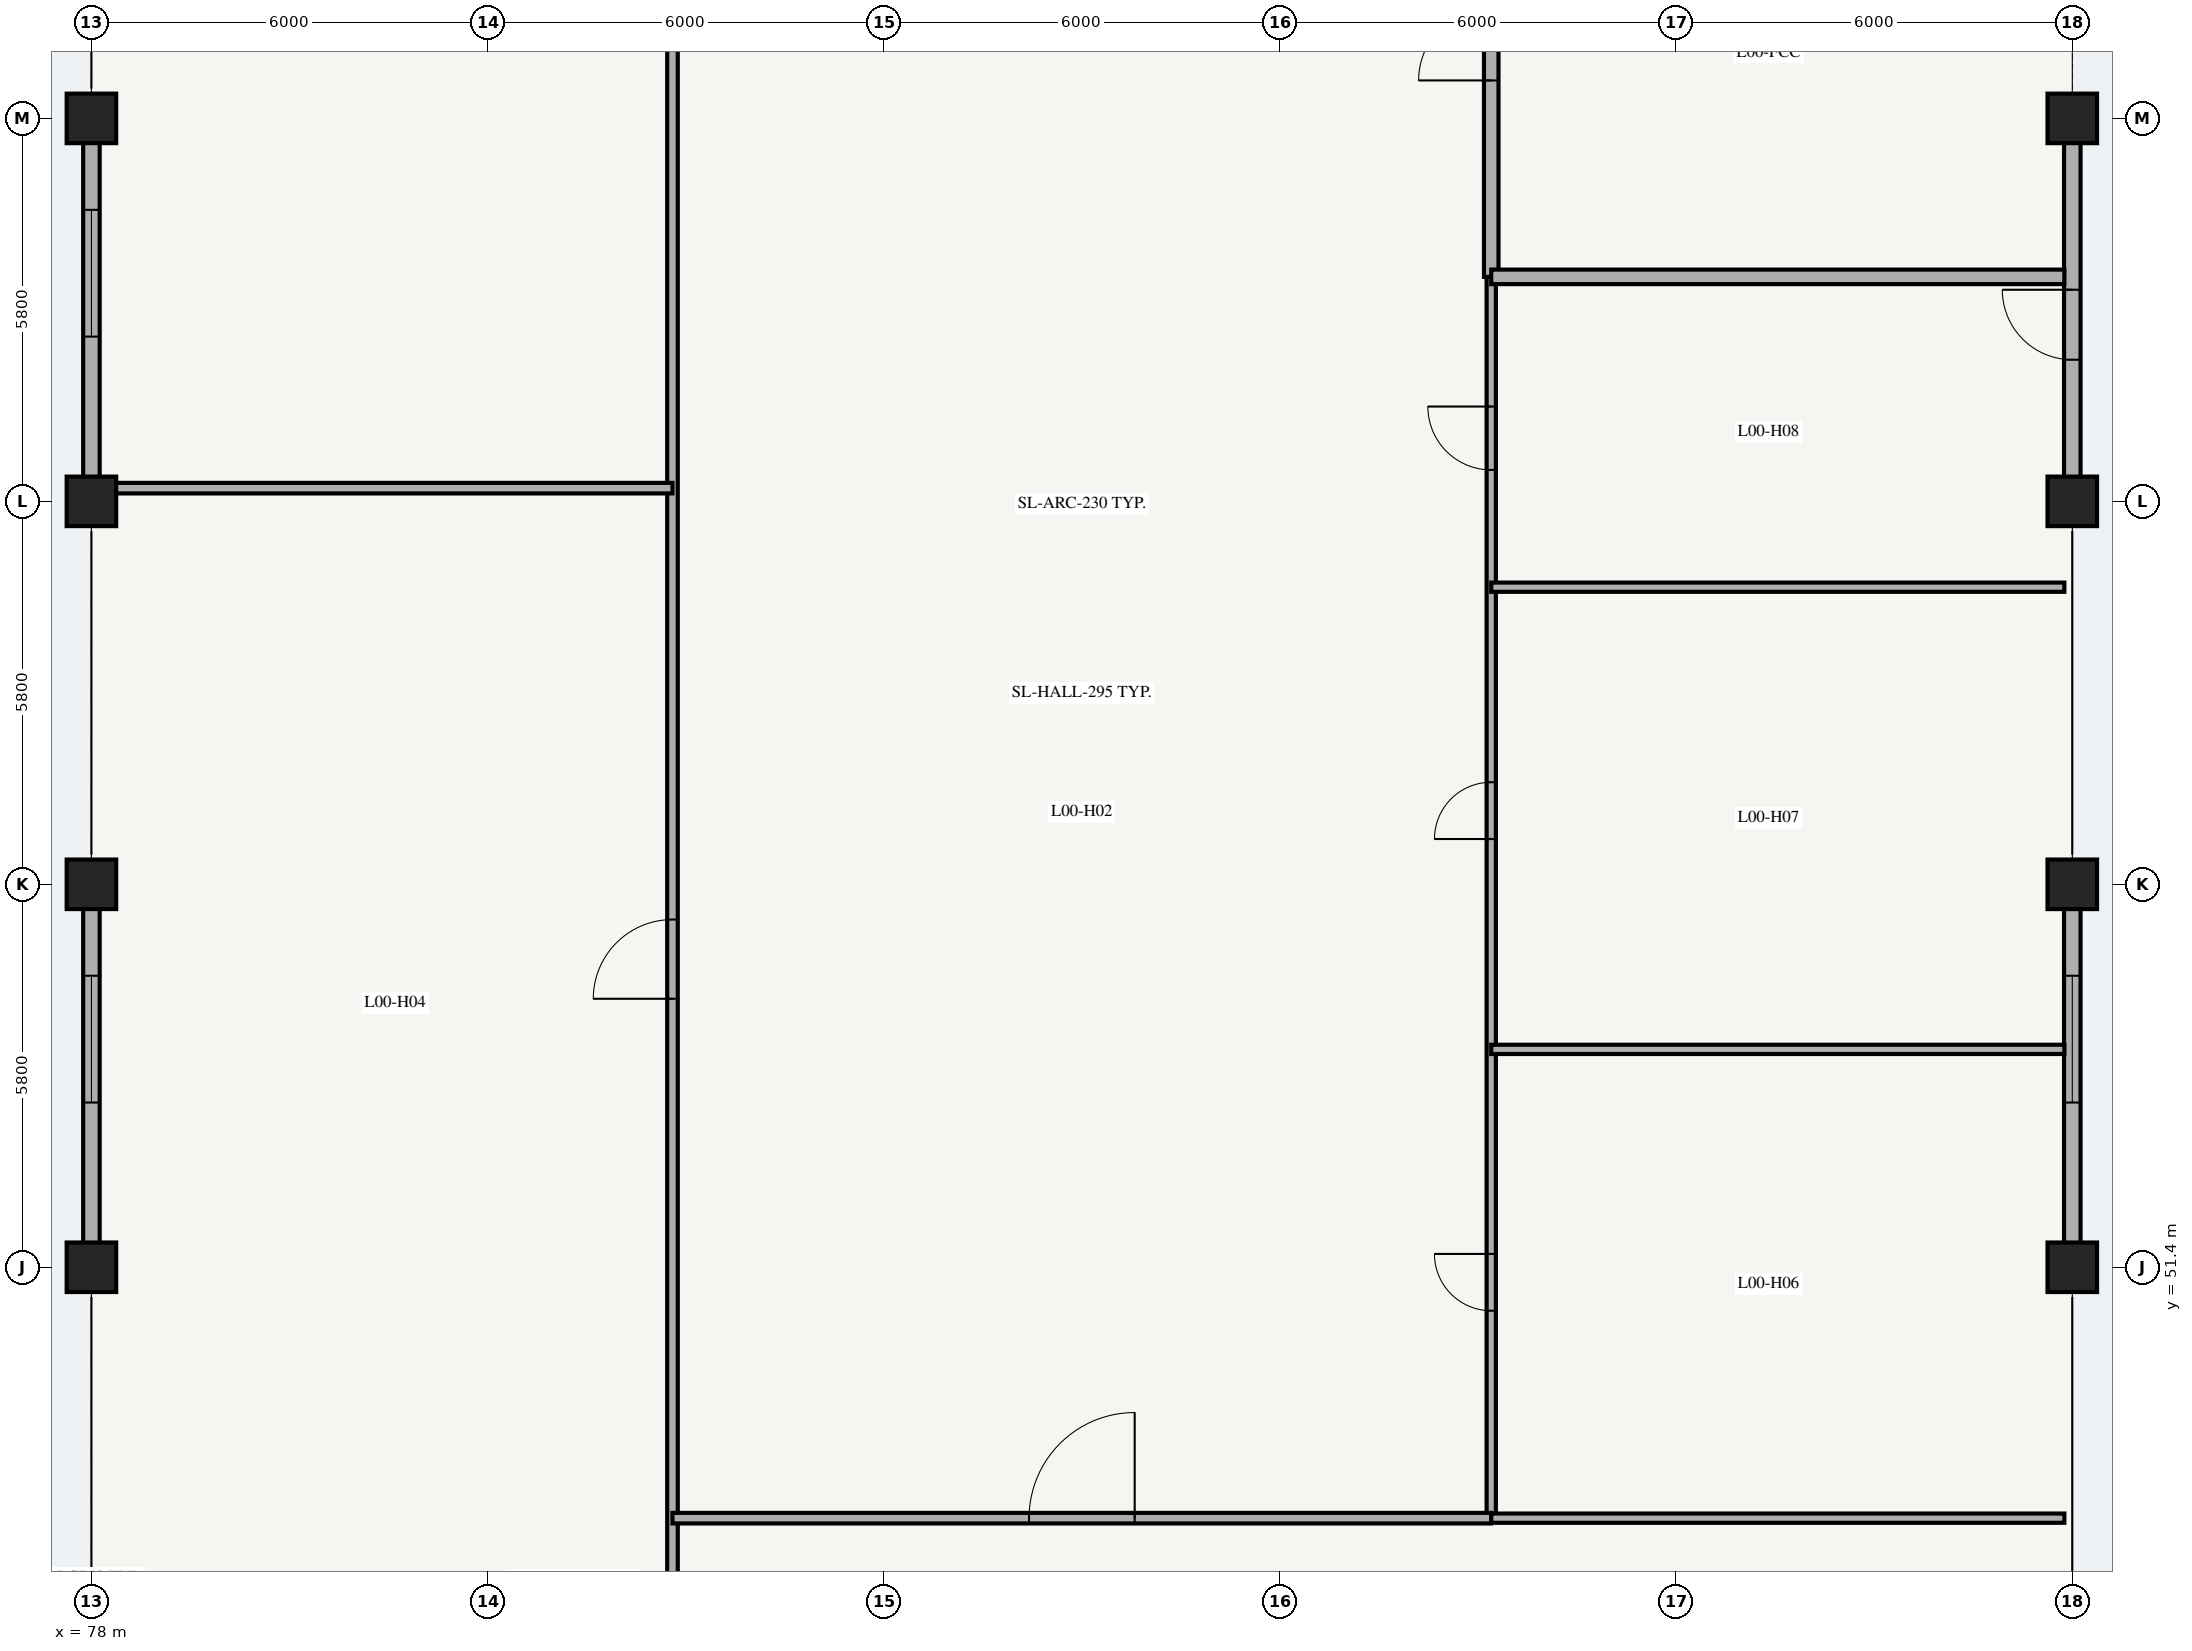
"""IFC4 building model, lengths in metres.
Left out: names, types, materials, properties, quantities, classifications, styles, units other than length and angle.
Written with IfcOpenShell. Run it as: python <this file> out.ifc"""

import sys

from ifc_helpers import new_model, si_unit, direction, frame, frame_2d, origin, origin_2d, place, context, subcontext, project, spatial, rectangle, extrude, element, fill, save


model = new_model("IFC4")
c1 = context("Model", 3, precision=1e-05, world=origin(), true_north=direction((0.0, 1.0)))
c2 = subcontext(c1, "Body", "Model", "MODEL_VIEW")
j1 = project(units=[si_unit("LENGTHUNIT", "METRE"), si_unit("PLANEANGLEUNIT", "RADIAN")], contexts=[c1])
p1 = place(None, origin())
s1 = spatial("IfcSite", under=j1, at=p1, CompositionType="ELEMENT")
p2 = place(p1, origin())
s2 = spatial("IfcBuilding", under=s1, at=p2, CompositionType="ELEMENT")
p3 = place(p2, origin())
s3 = spatial("IfcBuildingStorey", under=s2, at=p3, CompositionType="ELEMENT", Elevation=0.0)
for number, where, z_axis, x_axis in (
    (1, (78.0, 51.4, 0.0), (0.0, 0.0, 1.0), (1.0, 0.0, 0.0)),
    (2, (78.0, 57.2, 0.0), (0.0, 0.0, 1.0), (1.0, 0.0, 0.0)),
    (3, (78.0, 63.0, 0.0), (0.0, 0.0, 1.0), (1.0, 0.0, 0.0)),
    (4, (78.0, 68.8, 0.0), (0.0, 0.0, 1.0), (1.0, 0.0, 0.0)),
    (5, (108.0, 51.4, 0.0), (0.0, 0.0, 1.0), (1.0, 0.0, 0.0)),
    (6, (108.0, 57.2, 0.0), (0.0, 0.0, 1.0), (1.0, 0.0, 0.0)),
    (7, (108.0, 63.0, 0.0), (0.0, 0.0, 1.0), (1.0, 0.0, 0.0)),
    (8, (108.0, 68.8, 0.0), (0.0, 0.0, 1.0), (1.0, 0.0, 0.0)),
):
    element("IfcColumn", number, at=place(p3, frame(where, z_axis=z_axis, x_axis=x_axis)), inside=s3, PredefinedType="COLUMN", context=c2, shape_type="SweptSolid", body=[
        extrude(rectangle(XDim=0.75, YDim=0.75, at=origin_2d()), origin(), (0.0, 0.0, 1.0), 4.465),
    ])
p4 = place(p3, frame((78.0, 51.745, 0.0), z_axis=(0.0, 0.0, 1.0), x_axis=(0.0, 1.0, 0.0)))
e9 = element("IfcWall", 9, at=p4, inside=s3, PredefinedType="SOLIDWALL", context=c2, shape_type="SweptSolid", body=[
    extrude(rectangle(XDim=5.11, YDim=0.25, at=frame_2d((2.555, 0.0))), origin(), (0.0, 0.0, 1.0), 3.75),
])
p5 = place(p4, frame((2.15, 0.0, 0.6)))
e10 = element("IfcOpeningElement", 10, at=p5, cuts=e9, PredefinedType="OPENING", context=c2, shape_type="SweptSolid", body=[
    extrude(rectangle(XDim=1.92, YDim=2.15, at=frame_2d((0.96, 1.075))), frame((0.0, 0.135, 0.0), z_axis=(0.0, -1.0, 0.0), x_axis=(1.0, 0.0, 0.0)), (0.0, 0.0, 1.0), 0.27),
])
p6 = place(p3, frame((108.0, 51.745, 0.0), z_axis=(0.0, 0.0, 1.0), x_axis=(0.0, 1.0, 0.0)))
e11 = element("IfcWall", 11, at=p6, inside=s3, PredefinedType="SOLIDWALL", context=c2, shape_type="SweptSolid", body=[
    extrude(rectangle(XDim=5.11, YDim=0.25, at=frame_2d((2.555, 0.0))), origin(), (0.0, 0.0, 1.0), 3.75),
])
p7 = place(p6, frame((2.15, 0.0, 0.6)))
e12 = element("IfcOpeningElement", 12, at=p7, cuts=e11, PredefinedType="OPENING", context=c2, shape_type="SweptSolid", body=[
    extrude(rectangle(XDim=1.92, YDim=2.15, at=frame_2d((0.96, 1.075))), frame((0.0, 0.135, 0.0), z_axis=(0.0, -1.0, 0.0), x_axis=(1.0, 0.0, 0.0)), (0.0, 0.0, 1.0), 0.27),
])
p8 = place(p3, frame((78.0, 63.345, 0.0), z_axis=(0.0, 0.0, 1.0), x_axis=(0.0, 1.0, 0.0)))
e13 = element("IfcWall", 13, at=p8, inside=s3, PredefinedType="SOLIDWALL", context=c2, shape_type="SweptSolid", body=[
    extrude(rectangle(XDim=5.11, YDim=0.25, at=frame_2d((2.555, 0.0))), origin(), (0.0, 0.0, 1.0), 3.75),
])
p9 = place(p8, frame((2.15, 0.0, 0.6)))
e14 = element("IfcOpeningElement", 14, at=p9, cuts=e13, PredefinedType="OPENING", context=c2, shape_type="SweptSolid", body=[
    extrude(rectangle(XDim=1.92, YDim=2.15, at=frame_2d((0.96, 1.075))), frame((0.0, 0.135, 0.0), z_axis=(0.0, -1.0, 0.0), x_axis=(1.0, 0.0, 0.0)), (0.0, 0.0, 1.0), 0.27),
])
p10 = place(p3, frame((108.0, 63.345, 0.0), z_axis=(0.0, 0.0, 1.0), x_axis=(0.0, 1.0, 0.0)))
e15 = element("IfcWall", 15, at=p10, inside=s3, PredefinedType="SOLIDWALL", context=c2, shape_type="SweptSolid", body=[
    extrude(rectangle(XDim=5.11, YDim=0.25, at=frame_2d((2.555, 0.0))), origin(), (0.0, 0.0, 1.0), 3.75),
])
p11 = place(p10, frame((1.8, 0.0, 0.0)))
e16 = element("IfcOpeningElement", 16, at=p11, cuts=e15, PredefinedType="OPENING", context=c2, shape_type="SweptSolid", body=[
    extrude(rectangle(XDim=1.06, YDim=2.15, at=frame_2d((0.53, 1.075))), frame((0.0, 0.135, 0.0), z_axis=(0.0, -1.0, 0.0), x_axis=(1.0, 0.0, 0.0)), (0.0, 0.0, 1.0), 0.27),
])
p12 = place(p3, frame((86.8, 46.65, 0.0), z_axis=(0.0, 0.0, 1.0), x_axis=(0.0, 1.0, 0.0)))
e17 = element("IfcWall", 17, at=p12, inside=s3, PredefinedType="PARTITIONING", context=c2, shape_type="SweptSolid", body=[
    extrude(rectangle(XDim=33.63, YDim=0.16, at=frame_2d((16.815, 0.0))), origin(), (0.0, 0.0, 1.0), 3.52),
])
p13 = place(p12, frame((8.816, 0.0, 0.0)))
e18 = element("IfcOpeningElement", 18, at=p13, cuts=e17, PredefinedType="OPENING", context=c2, shape_type="SweptSolid", body=[
    extrude(rectangle(XDim=1.2, YDim=2.15, at=frame_2d((0.6, 1.075))), frame((0.0, 0.09, 0.0), z_axis=(0.0, -1.0, 0.0), x_axis=(1.0, 0.0, 0.0)), (0.0, 0.0, 1.0), 0.18),
])
p14 = place(p12, frame((24.286, 0.0, 0.0)))
e19 = element("IfcOpeningElement", 19, at=p14, cuts=e17, PredefinedType="OPENING", context=c2, shape_type="SweptSolid", body=[
    extrude(rectangle(XDim=1.2, YDim=2.15, at=frame_2d((0.6, 1.075))), frame((0.0, 0.09, 0.0), z_axis=(0.0, -1.0, 0.0), x_axis=(1.0, 0.0, 0.0)), (0.0, 0.0, 1.0), 0.18),
])
p15 = place(p3, frame((99.2, 47.6, 0.0), z_axis=(0.0, 0.0, 1.0), x_axis=(0.0, 1.0, 0.0)))
e20 = element("IfcWall", 20, at=p15, inside=s3, PredefinedType="PLUMBINGWALL", context=c2, shape_type="SweptSolid", body=[
    extrude(rectangle(XDim=18.8, YDim=0.14, at=frame_2d((9.4, 0.0))), origin(), (0.0, 0.0, 1.0), 3.52),
])
p16 = place(p15, frame((3.142, 0.0, 0.0)))
e21 = element("IfcOpeningElement", 21, at=p16, cuts=e20, PredefinedType="OPENING", context=c2, shape_type="SweptSolid", body=[
    extrude(rectangle(XDim=0.86, YDim=2.06, at=frame_2d((0.43, 1.03))), frame((0.0, 0.08, 0.0), z_axis=(0.0, -1.0, 0.0), x_axis=(1.0, 0.0, 0.0)), (0.0, 0.0, 1.0), 0.16),
])
p17 = place(p15, frame((10.286, 0.0, 0.0)))
e22 = element("IfcOpeningElement", 22, at=p17, cuts=e20, PredefinedType="OPENING", context=c2, shape_type="SweptSolid", body=[
    extrude(rectangle(XDim=0.86, YDim=2.06, at=frame_2d((0.43, 1.03))), frame((0.0, 0.08, 0.0), z_axis=(0.0, -1.0, 0.0), x_axis=(1.0, 0.0, 0.0)), (0.0, 0.0, 1.0), 0.16),
])
p18 = place(p15, frame((15.876, 0.0, 0.0)))
e23 = element("IfcOpeningElement", 23, at=p18, cuts=e20, PredefinedType="OPENING", context=c2, shape_type="SweptSolid", body=[
    extrude(rectangle(XDim=0.96, YDim=2.1, at=frame_2d((0.48, 1.05))), frame((0.0, 0.08, 0.0), z_axis=(0.0, -1.0, 0.0), x_axis=(1.0, 0.0, 0.0)), (0.0, 0.0, 1.0), 0.16),
])
p19 = place(p3, frame((99.2, 66.4, 0.0), z_axis=(0.0, 0.0, 1.0), x_axis=(0.0, 1.0, 0.0)))
e24 = element("IfcWall", 24, at=p19, inside=s3, PredefinedType="PARTITIONING", context=c2, shape_type="SweptSolid", body=[
    extrude(rectangle(XDim=7.05, YDim=0.22, at=frame_2d((3.525, 0.0))), origin(), (0.0, 0.0, 1.0), 3.52),
])
p20 = place(p19, frame((2.975, 0.0, 0.0)))
e25 = element("IfcOpeningElement", 25, at=p20, cuts=e24, PredefinedType="OPENING", context=c2, shape_type="SweptSolid", body=[
    extrude(rectangle(XDim=1.1, YDim=2.15, at=frame_2d((0.55, 1.075))), frame((0.0, 0.12, 0.0), z_axis=(0.0, -1.0, 0.0), x_axis=(1.0, 0.0, 0.0)), (0.0, 0.0, 1.0), 0.24),
])
p21 = place(p3, frame((86.8, 47.6, 0.0), z_axis=(0.0, 0.0, 1.0), x_axis=(1.0, 0.0, 0.0)))
e26 = element("IfcWall", 26, at=p21, inside=s3, PredefinedType="PARTITIONING", context=c2, shape_type="SweptSolid", body=[
    extrude(rectangle(XDim=12.4, YDim=0.16, at=frame_2d((6.2, 0.0))), origin(), (0.0, 0.0, 1.0), 3.52),
])
p22 = place(p21, frame((5.4, 0.0, 0.0)))
e27 = element("IfcOpeningElement", 27, at=p22, cuts=e26, PredefinedType="OPENING", context=c2, shape_type="SweptSolid", body=[
    extrude(rectangle(XDim=1.6, YDim=2.25, at=frame_2d((0.8, 1.125))), frame((0.0, 0.09, 0.0), z_axis=(0.0, -1.0, 0.0), x_axis=(1.0, 0.0, 0.0)), (0.0, 0.0, 1.0), 0.18),
])
for number, where, z_axis, x_axis in (
    (28, (99.2, 47.6, 0.0), (0.0, 0.0, 1.0), (1.0, 0.0, 0.0)),
    (29, (99.2, 54.7, 0.0), (0.0, 0.0, 1.0), (1.0, 0.0, 0.0)),
    (30, (99.2, 61.7, 0.0), (0.0, 0.0, 1.0), (1.0, 0.0, 0.0)),
):
    element("IfcWall", number, at=place(p3, frame(where, z_axis=z_axis, x_axis=x_axis)), inside=s3, PredefinedType="PLUMBINGWALL", context=c2, shape_type="SweptSolid", body=[
        extrude(rectangle(XDim=8.68, YDim=0.14, at=frame_2d((4.34, 0.0))), origin(), (0.0, 0.0, 1.0), 3.52),
    ])
p23 = place(p3, frame((99.2, 66.4, 0.0), z_axis=(0.0, 0.0, 1.0), x_axis=(1.0, 0.0, 0.0)))
e31 = element("IfcWall", 31, at=p23, inside=s3, PredefinedType="PARTITIONING", context=c2, shape_type="SweptSolid", body=[
    extrude(rectangle(XDim=8.68, YDim=0.22, at=frame_2d((4.34, 0.0))), origin(), (0.0, 0.0, 1.0), 3.52),
])
p24 = place(p3, frame((78.12, 63.2, 0.0), z_axis=(0.0, 0.0, 1.0), x_axis=(1.0, 0.0, 0.0)))
e32 = element("IfcWall", 32, at=p24, inside=s3, PredefinedType="PARTITIONING", context=c2, shape_type="SweptSolid", body=[
    extrude(rectangle(XDim=8.68, YDim=0.16, at=frame_2d((4.34, 0.0))), origin(), (0.0, 0.0, 1.0), 3.52),
])
p25 = place(p5, origin())
e33 = element("IfcWindow", 33, at=p25, inside=s3, PartitioningType="SINGLE_PANEL", PredefinedType="WINDOW", context=c2, shape_type="SweptSolid", body=[
    extrude(rectangle(XDim=1.92, YDim=2.15, at=frame_2d((0.96, 1.075))), frame((0.0, 0.03, 0.0), z_axis=(0.0, -1.0, 0.0), x_axis=(1.0, 0.0, 0.0)), (0.0, 0.0, 1.0), 0.06),
])
fill(e10, e33)
p26 = place(p7, origin())
e34 = element("IfcWindow", 34, at=p26, inside=s3, PartitioningType="SINGLE_PANEL", PredefinedType="WINDOW", context=c2, shape_type="SweptSolid", body=[
    extrude(rectangle(XDim=1.92, YDim=2.15, at=frame_2d((0.96, 1.075))), frame((0.0, 0.03, 0.0), z_axis=(0.0, -1.0, 0.0), x_axis=(1.0, 0.0, 0.0)), (0.0, 0.0, 1.0), 0.06),
])
fill(e12, e34)
p27 = place(p9, origin())
e35 = element("IfcWindow", 35, at=p27, inside=s3, PartitioningType="SINGLE_PANEL", PredefinedType="WINDOW", context=c2, shape_type="SweptSolid", body=[
    extrude(rectangle(XDim=1.92, YDim=2.15, at=frame_2d((0.96, 1.075))), frame((0.0, 0.03, 0.0), z_axis=(0.0, -1.0, 0.0), x_axis=(1.0, 0.0, 0.0)), (0.0, 0.0, 1.0), 0.06),
])
fill(e14, e35)
p28 = place(p11, origin())
e36 = element("IfcDoor", 36, at=p28, inside=s3, OperationType="SINGLE_SWING_RIGHT", PredefinedType="DOOR", context=c2, shape_type="SweptSolid", body=[
    extrude(rectangle(XDim=1.06, YDim=2.15, at=frame_2d((0.53, 1.075))), frame((0.0, 0.025, 0.0), z_axis=(0.0, -1.0, 0.0), x_axis=(1.0, 0.0, 0.0)), (0.0, 0.0, 1.0), 0.05),
])
fill(e16, e36)
p29 = place(p13, origin())
e37 = element("IfcDoor", 37, at=p29, inside=s3, OperationType="SINGLE_SWING_LEFT", PredefinedType="DOOR", context=c2, shape_type="SweptSolid", body=[
    extrude(rectangle(XDim=1.2, YDim=2.15, at=frame_2d((0.6, 1.075))), frame((0.0, 0.025, 0.0), z_axis=(0.0, -1.0, 0.0), x_axis=(1.0, 0.0, 0.0)), (0.0, 0.0, 1.0), 0.05),
])
fill(e18, e37)
p30 = place(p16, origin())
e38 = element("IfcDoor", 38, at=p30, inside=s3, OperationType="SINGLE_SWING_RIGHT", PredefinedType="DOOR", context=c2, shape_type="SweptSolid", body=[
    extrude(rectangle(XDim=0.86, YDim=2.06, at=frame_2d((0.43, 1.03))), frame((0.0, 0.025, 0.0), z_axis=(0.0, -1.0, 0.0), x_axis=(1.0, 0.0, 0.0)), (0.0, 0.0, 1.0), 0.05),
])
fill(e21, e38)
p31 = place(p17, origin())
e39 = element("IfcDoor", 39, at=p31, inside=s3, OperationType="SINGLE_SWING_LEFT", PredefinedType="DOOR", context=c2, shape_type="SweptSolid", body=[
    extrude(rectangle(XDim=0.86, YDim=2.06, at=frame_2d((0.43, 1.03))), frame((0.0, 0.025, 0.0), z_axis=(0.0, -1.0, 0.0), x_axis=(1.0, 0.0, 0.0)), (0.0, 0.0, 1.0), 0.05),
])
fill(e22, e39)
p32 = place(p18, origin())
e40 = element("IfcDoor", 40, at=p32, inside=s3, OperationType="SINGLE_SWING_RIGHT", PredefinedType="DOOR", context=c2, shape_type="SweptSolid", body=[
    extrude(rectangle(XDim=0.96, YDim=2.1, at=frame_2d((0.48, 1.05))), frame((0.0, 0.025, 0.0), z_axis=(0.0, -1.0, 0.0), x_axis=(1.0, 0.0, 0.0)), (0.0, 0.0, 1.0), 0.05),
])
fill(e23, e40)
p33 = place(p20, origin())
e41 = element("IfcDoor", 41, at=p33, inside=s3, OperationType="SINGLE_SWING_LEFT", PredefinedType="DOOR", context=c2, shape_type="SweptSolid", body=[
    extrude(rectangle(XDim=1.1, YDim=2.15, at=frame_2d((0.55, 1.075))), frame((0.0, 0.025, 0.0), z_axis=(0.0, -1.0, 0.0), x_axis=(1.0, 0.0, 0.0)), (0.0, 0.0, 1.0), 0.05),
])
fill(e25, e41)
p34 = place(p22, origin())
e42 = element("IfcDoor", 42, at=p34, inside=s3, OperationType="DOUBLE_DOOR_SINGLE_SWING", PredefinedType="DOOR", context=c2, shape_type="SweptSolid", body=[
    extrude(rectangle(XDim=1.6, YDim=2.25, at=frame_2d((0.8, 1.125))), frame((0.0, 0.025, 0.0), z_axis=(0.0, -1.0, 0.0), x_axis=(1.0, 0.0, 0.0)), (0.0, 0.0, 1.0), 0.05),
])
fill(e27, e42)
save(model, sys.argv[1])
